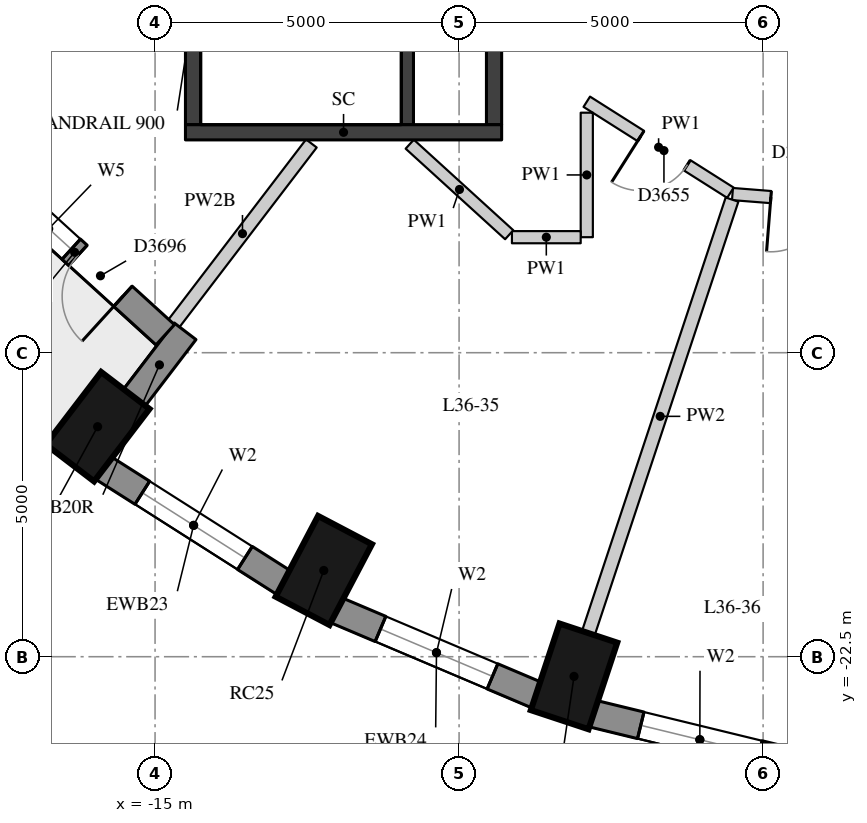
"""IFC4 building model, lengths in metres.
Left out: names, types, materials, properties, quantities, classifications, styles, units other than length and angle.
Written with IfcOpenShell. Run it as: python <this file> out.ifc"""

import sys

from ifc_helpers import new_model, si_unit, direction, frame, frame_2d, origin, origin_2d, place, context, subcontext, project, spatial, rectangle, extrude, element, fill, save


model = new_model("IFC4")
c1 = context("Model", 3, precision=1e-05, world=origin(), true_north=direction((0.0, 1.0)))
c2 = subcontext(c1, "Body", "Model", "MODEL_VIEW")
j1 = project(units=[si_unit("LENGTHUNIT", "METRE"), si_unit("PLANEANGLEUNIT", "RADIAN")], contexts=[c1])
p1 = place(None, origin())
s1 = spatial("IfcSite", under=j1, at=p1, CompositionType="ELEMENT")
p2 = place(p1, origin())
s2 = spatial("IfcBuilding", under=s1, at=p2, CompositionType="ELEMENT")
p3 = place(p2, frame((0.0, 0.0, 128.5)))
s3 = spatial("IfcBuildingStorey", under=s2, at=p3, CompositionType="ELEMENT", Elevation=128.5)
for number, where, z_axis, x_axis in (
    (1, (-15.945, -18.717, 0.0), (0.0, 0.0, 1.0), (-0.607, -0.795, 0.0)),
    (2, (-12.225, -21.082, 0.0), (0.0, 0.0, 1.0), (-0.465, -0.885, 0.0)),
    (3, (-8.11, -22.824, 0.0), (0.0, 0.0, 1.0), (-0.315, -0.949, 0.0)),
):
    element("IfcColumn", number, at=place(p3, frame(where, z_axis=z_axis, x_axis=x_axis)), inside=s3, PredefinedType="COLUMN", context=c2, shape_type="SweptSolid", body=[
        extrude(rectangle(XDim=1.5, YDim=1.0, at=origin_2d()), origin(), (0.0, 0.0, 1.0), 3.3),
    ])
p4 = place(p3, frame((-15.856, -19.392, 0.0), z_axis=(0.0, 0.0, 1.0), x_axis=(0.843891947083, -0.53651317006, 0.0)))
e4 = element("IfcWall", 4, at=p4, inside=s3, PredefinedType="SOLIDWALL", context=c2, shape_type="SweptSolid", body=[
    extrude(rectangle(XDim=3.532, YDim=0.45, at=frame_2d((1.766, 0.0))), origin(), (0.0, 0.0, 1.0), 3.02),
])
p5 = place(p4, frame((0.766, 0.0, 0.4)))
e5 = element("IfcOpeningElement", 5, at=p5, cuts=e4, PredefinedType="OPENING", context=c2, shape_type="SweptSolid", body=[
    extrude(rectangle(XDim=2.0, YDim=1.75, at=frame_2d((1.0, 0.875))), frame((0.0, 0.235, 0.0), z_axis=(0.0, -1.0, 0.0), x_axis=(1.0, 0.0, 0.0)), (0.0, 0.0, 1.0), 0.47),
])
p6 = place(p3, frame((-12.025, -21.733, 0.0), z_axis=(0.0, 0.0, 1.0), x_axis=(0.920879975612, -0.389846213932, 0.0)))
e6 = element("IfcWall", 6, at=p6, inside=s3, PredefinedType="SOLIDWALL", context=c2, shape_type="SweptSolid", body=[
    extrude(rectangle(XDim=3.592, YDim=0.45, at=frame_2d((1.796, 0.0))), origin(), (0.0, 0.0, 1.0), 3.02),
])
p7 = place(p6, frame((0.796, 0.0, 0.4)))
e7 = element("IfcOpeningElement", 7, at=p7, cuts=e6, PredefinedType="OPENING", context=c2, shape_type="SweptSolid", body=[
    extrude(rectangle(XDim=2.0, YDim=1.75, at=frame_2d((1.0, 0.875))), frame((0.0, 0.235, 0.0), z_axis=(0.0, -1.0, 0.0), x_axis=(1.0, 0.0, 0.0)), (0.0, 0.0, 1.0), 0.47),
])
p8 = place(p3, frame((-7.807, -23.435, 0.0), z_axis=(0.0, 0.0, 1.0), x_axis=(0.971667603162, -0.236351579148, 0.0)))
e8 = element("IfcWall", 8, at=p8, inside=s3, PredefinedType="SOLIDWALL", context=c2, shape_type="SweptSolid", body=[
    extrude(rectangle(XDim=3.635, YDim=0.45, at=frame_2d((1.817, 0.0))), origin(), (0.0, 0.0, 1.0), 3.02),
])
p9 = place(p8, frame((0.817, 0.0, 0.4)))
e9 = element("IfcOpeningElement", 9, at=p9, cuts=e8, PredefinedType="OPENING", context=c2, shape_type="SweptSolid", body=[
    extrude(rectangle(XDim=2.0, YDim=1.75, at=frame_2d((1.0, 0.875))), frame((0.0, 0.235, 0.0), z_axis=(0.0, -1.0, 0.0), x_axis=(1.0, 0.0, 0.0)), (0.0, 0.0, 1.0), 0.47),
])
p10 = place(p3, frame((-15.35, -18.253, 0.0), z_axis=(0.0, 0.0, 1.0), x_axis=(0.607026495834, 0.794681592435, 0.0)))
e10 = element("IfcWall", 10, at=p10, inside=s3, PredefinedType="SOLIDWALL", context=c2, shape_type="SweptSolid", body=[
    extrude(rectangle(XDim=1.391, YDim=0.45, at=frame_2d((0.695, 0.0))), origin(), (0.0, 0.0, 1.0), 2.57),
])
p11 = place(p3, frame((-17.814, -14.491, 0.0), z_axis=(0.0, 0.0, 1.0), x_axis=(0.73951517403, -0.673139886933, 0.0)))
e11 = element("IfcWall", 11, at=p11, inside=s3, PredefinedType="SOLIDWALL", context=c2, shape_type="SweptSolid", body=[
    extrude(rectangle(XDim=4.031, YDim=0.45, at=frame_2d((2.016, 0.0))), origin(), (0.0, 0.0, 1.0), 3.02),
])
p12 = place(p11, frame((0.941, 0.0, 0.4)))
e12 = element("IfcOpeningElement", 12, at=p12, cuts=e11, PredefinedType="OPENING", context=c2, shape_type="SweptSolid", body=[
    extrude(rectangle(XDim=1.0, YDim=1.75, at=frame_2d((0.5, 0.875))), frame((0.0, 0.235, 0.0), z_axis=(0.0, -1.0, 0.0), x_axis=(1.0, 0.0, 0.0)), (0.0, 0.0, 1.0), 0.47),
])
p13 = place(p11, frame((2.091, 0.0, 0.0)))
e13 = element("IfcOpeningElement", 13, at=p13, cuts=e11, PredefinedType="OPENING", context=c2, shape_type="SweptSolid", body=[
    extrude(rectangle(XDim=1.0, YDim=2.15, at=frame_2d((0.5, 1.075))), frame((0.0, 0.235, 0.0), z_axis=(0.0, -1.0, 0.0), x_axis=(1.0, 0.0, 0.0)), (0.0, 0.0, 1.0), 0.47),
])
p14 = place(p3, frame((-10.85, -13.75, 0.0), z_axis=(0.0, 0.0, 1.0), x_axis=(0.0, 1.0, 0.0)))
e14 = element("IfcWall", 14, at=p14, inside=s3, PredefinedType="SHEAR", context=c2, shape_type="SweptSolid", body=[
    extrude(rectangle(XDim=6.0, YDim=0.2, at=frame_2d((3.0, 0.0))), origin(), (0.0, 0.0, 1.0), 3.02),
])
p15 = place(p14, frame((4.4, 0.0, 0.0)))
e15 = element("IfcOpeningElement", 15, at=p15, cuts=e14, PredefinedType="OPENING", context=c2, shape_type="SweptSolid", body=[
    extrude(rectangle(XDim=1.5, YDim=2.1, at=frame_2d((0.75, 1.05))), frame((0.0, 0.11, 0.0), z_axis=(0.0, -1.0, 0.0), x_axis=(1.0, 0.0, 0.0)), (0.0, 0.0, 1.0), 0.22),
])
p16 = place(p3, frame((-14.375, -13.75, -0.28), z_axis=(0.0, 0.0, 1.0), x_axis=(0.0, 1.0, 0.0)))
e16 = element("IfcWall", 16, at=p16, inside=s3, PredefinedType="SHEAR", context=c2, shape_type="SweptSolid", body=[
    extrude(rectangle(XDim=6.0, YDim=0.25, at=frame_2d((3.0, 0.0))), origin(), (0.0, 0.0, 1.0), 3.3),
])
p17 = place(p3, frame((-9.425, -13.75, -0.28), z_axis=(0.0, 0.0, 1.0), x_axis=(0.0, 1.0, 0.0)))
e17 = element("IfcWall", 17, at=p17, inside=s3, PredefinedType="SHEAR", context=c2, shape_type="SweptSolid", body=[
    extrude(rectangle(XDim=6.0, YDim=0.25, at=frame_2d((3.0, 0.0))), origin(), (0.0, 0.0, 1.0), 3.3),
])
p18 = place(p17, frame((2.4, 0.0, 0.28)))
e18 = element("IfcOpeningElement", 18, at=p18, cuts=e17, PredefinedType="OPENING", context=c2, shape_type="SweptSolid", body=[
    extrude(rectangle(XDim=1.5, YDim=2.1, at=frame_2d((0.75, 1.05))), frame((0.0, 0.135, 0.0), z_axis=(0.0, -1.0, 0.0), x_axis=(1.0, 0.0, 0.0)), (0.0, 0.0, 1.0), 0.27),
])
p19 = place(p3, frame((-14.5, -13.875, -0.28), z_axis=(0.0, 0.0, 1.0), x_axis=(1.0, 0.0, 0.0)))
e19 = element("IfcWall", 19, at=p19, inside=s3, PredefinedType="SHEAR", context=c2, shape_type="SweptSolid", body=[
    extrude(rectangle(XDim=5.2, YDim=0.25, at=frame_2d((2.6, 0.0))), origin(), (0.0, 0.0, 1.0), 3.3),
])
p20 = place(p3, frame((3.971, -15.641, 0.0), z_axis=(0.0, 0.0, 1.0), x_axis=(-0.996873811728, 0.079010148026, 0.0)))
e20 = element("IfcWall", 20, at=p20, inside=s3, PredefinedType="PARTITIONING", context=c2, shape_type="SweptSolid", body=[
    extrude(rectangle(XDim=9.505, YDim=0.2, at=frame_2d((4.752, 0.0))), origin(), (0.0, 0.0, 1.0), 2.42),
])
p21 = place(p20, frame((7.971, 0.0, 0.0)))
e21 = element("IfcOpeningElement", 21, at=p21, cuts=e20, PredefinedType="OPENING", context=c2, shape_type="SweptSolid", body=[
    extrude(rectangle(XDim=0.9, YDim=2.1, at=frame_2d((0.45, 1.05))), frame((0.0, 0.11, 0.0), z_axis=(0.0, -1.0, 0.0), x_axis=(1.0, 0.0, 0.0)), (0.0, 0.0, 1.0), 0.22),
])
p22 = place(p20, frame((3.391, 0.0, 0.0)))
e22 = element("IfcOpeningElement", 22, at=p22, cuts=e20, PredefinedType="OPENING", context=c2, shape_type="SweptSolid", body=[
    extrude(rectangle(XDim=1.0, YDim=2.1, at=frame_2d((0.5, 1.05))), frame((0.0, 0.11, 0.0), z_axis=(0.0, -1.0, 0.0), x_axis=(1.0, 0.0, 0.0)), (0.0, 0.0, 1.0), 0.22),
])
p23 = place(p20, frame((1.866, 0.0, 0.0)))
e23 = element("IfcOpeningElement", 23, at=p23, cuts=e20, PredefinedType="OPENING", context=c2, shape_type="SweptSolid", body=[
    extrude(rectangle(XDim=0.9, YDim=2.1, at=frame_2d((0.45, 1.05))), frame((0.0, 0.11, 0.0), z_axis=(0.0, -1.0, 0.0), x_axis=(1.0, 0.0, 0.0)), (0.0, 0.0, 1.0), 0.22),
])
p24 = place(p3, frame((-5.537, -14.869, 0.0), z_axis=(0.0, 0.0, 1.0), x_axis=(-0.844770404655, 0.535128922242, 0.0)))
e24 = element("IfcWall", 24, at=p24, inside=s3, PredefinedType="PARTITIONING", context=c2, shape_type="SweptSolid", body=[
    extrude(rectangle(XDim=2.797, YDim=0.2, at=frame_2d((1.398, 0.0))), origin(), (0.0, 0.0, 1.0), 3.02),
])
p25 = place(p24, frame((0.844, 0.0, 0.0)))
e25 = element("IfcOpeningElement", 25, at=p25, cuts=e24, PredefinedType="OPENING", context=c2, shape_type="SweptSolid", body=[
    extrude(rectangle(XDim=0.9, YDim=2.1, at=frame_2d((0.45, 1.05))), frame((0.0, 0.11, 0.0), z_axis=(0.0, -1.0, 0.0), x_axis=(1.0, 0.0, 0.0)), (0.0, 0.0, 1.0), 0.22),
])
p26 = place(p3, frame((-7.9, -13.552, 0.0), z_axis=(0.0, 0.0, 1.0), x_axis=(0.0, -1.0, 0.0)))
e26 = element("IfcWall", 26, at=p26, inside=s3, PredefinedType="PARTITIONING", context=c2, shape_type="SweptSolid", body=[
    extrude(rectangle(XDim=2.048, YDim=0.2, at=frame_2d((1.024, 0.0))), origin(), (0.0, 0.0, 1.0), 3.02),
])
p27 = place(p3, frame((-8.0, -15.6, 0.0), z_axis=(0.0, 0.0, 1.0), x_axis=(-1.0, 0.0, 0.0)))
e27 = element("IfcWall", 27, at=p27, inside=s3, PredefinedType="PARTITIONING", context=c2, shape_type="SweptSolid", body=[
    extrude(rectangle(XDim=1.131, YDim=0.2, at=frame_2d((0.565, 0.0))), origin(), (0.0, 0.0, 1.0), 3.02),
])
p28 = place(p3, frame((-9.176, -15.56, 0.0), z_axis=(0.0, 0.0, 1.0), x_axis=(-0.73943556447, 0.673227336044, 0.0)))
e28 = element("IfcWall", 28, at=p28, inside=s3, PredefinedType="PARTITIONING", context=c2, shape_type="SweptSolid", body=[
    extrude(rectangle(XDim=2.212, YDim=0.2, at=frame_2d((1.106, 0.0))), origin(), (0.0, 0.0, 1.0), 3.02),
])
p29 = place(p3, frame((-14.696, -17.025, 0.0), z_axis=(0.0, 0.0, 1.0), x_axis=(0.607059278405, 0.794656550028, 0.0)))
e29 = element("IfcWall", 29, at=p29, inside=s3, PredefinedType="PARTITIONING", context=c2, shape_type="SweptSolid", body=[
    extrude(rectangle(XDim=3.734, YDim=0.22, at=frame_2d((1.867, 0.0))), origin(), (0.0, 0.0, 1.0), 2.57),
])
p30 = place(p3, frame((-7.874, -22.112, 0.0), z_axis=(0.0, 0.0, 1.0), x_axis=(0.314559895628, 0.949237626763, 0.0)))
e30 = element("IfcWall", 30, at=p30, inside=s3, PredefinedType="PARTITIONING", context=c2, shape_type="SweptSolid", body=[
    extrude(rectangle(XDim=7.511, YDim=0.22, at=frame_2d((3.756, 0.0))), origin(), (0.0, 0.0, 1.0), 3.02),
])
p31 = place(p5, origin())
e31 = element("IfcWindow", 31, at=p31, inside=s3, PartitioningType="SINGLE_PANEL", PredefinedType="WINDOW", context=c2, shape_type="SweptSolid", body=[
    extrude(rectangle(XDim=2.0, YDim=1.75, at=frame_2d((1.0, 0.875))), frame((0.0, 0.035, 0.0), z_axis=(0.0, -1.0, 0.0), x_axis=(1.0, 0.0, 0.0)), (0.0, 0.0, 1.0), 0.06),
])
fill(e5, e31)
p32 = place(p7, origin())
e32 = element("IfcWindow", 32, at=p32, inside=s3, PartitioningType="SINGLE_PANEL", PredefinedType="WINDOW", context=c2, shape_type="SweptSolid", body=[
    extrude(rectangle(XDim=2.0, YDim=1.75, at=frame_2d((1.0, 0.875))), frame((0.0, 0.035, 0.0), z_axis=(0.0, -1.0, 0.0), x_axis=(1.0, 0.0, 0.0)), (0.0, 0.0, 1.0), 0.06),
])
fill(e7, e32)
p33 = place(p9, origin())
e33 = element("IfcWindow", 33, at=p33, inside=s3, PartitioningType="SINGLE_PANEL", PredefinedType="WINDOW", context=c2, shape_type="SweptSolid", body=[
    extrude(rectangle(XDim=2.0, YDim=1.75, at=frame_2d((1.0, 0.875))), frame((0.0, 0.035, 0.0), z_axis=(0.0, -1.0, 0.0), x_axis=(1.0, 0.0, 0.0)), (0.0, 0.0, 1.0), 0.06),
])
fill(e9, e33)
p34 = place(p12, origin())
e34 = element("IfcWindow", 34, at=p34, inside=s3, PartitioningType="SINGLE_PANEL", PredefinedType="WINDOW", context=c2, shape_type="SweptSolid", body=[
    extrude(rectangle(XDim=1.0, YDim=1.75, at=frame_2d((0.5, 0.875))), frame((0.0, 0.035, 0.0), z_axis=(0.0, -1.0, 0.0), x_axis=(1.0, 0.0, 0.0)), (0.0, 0.0, 1.0), 0.06),
])
fill(e12, e34)
p35 = place(p13, frame((1.0, 0.0, 0.0), z_axis=(0.0, 0.0, 1.0), x_axis=(-1.0, 0.0, 0.0)))
e35 = element("IfcDoor", 35, at=p35, inside=s3, OperationType="SINGLE_SWING_LEFT", PredefinedType="DOOR", context=c2, shape_type="SweptSolid", body=[
    extrude(rectangle(XDim=1.0, YDim=2.15, at=frame_2d((0.5, 1.075))), frame((0.0, 0.075, 0.0), z_axis=(0.0, -1.0, 0.0), x_axis=(1.0, 0.0, 0.0)), (0.0, 0.0, 1.0), 0.05),
])
fill(e13, e35)
p36 = place(p25, origin())
e36 = element("IfcDoor", 36, at=p36, inside=s3, OperationType="SINGLE_SWING_RIGHT", PredefinedType="DOOR", context=c2, shape_type="SweptSolid", body=[
    extrude(rectangle(XDim=0.9, YDim=2.1, at=frame_2d((0.45, 1.05))), frame((0.0, 0.025, 0.0), z_axis=(0.0, -1.0, 0.0), x_axis=(1.0, 0.0, 0.0)), (0.0, 0.0, 1.0), 0.05),
])
fill(e25, e36)
p37 = place(p21, origin())
e37 = element("IfcDoor", 37, at=p37, inside=s3, OperationType="SINGLE_SWING_RIGHT", PredefinedType="DOOR", context=c2, shape_type="SweptSolid", body=[
    extrude(rectangle(XDim=0.9, YDim=2.1, at=frame_2d((0.45, 1.05))), frame((0.0, 0.025, 0.0), z_axis=(0.0, -1.0, 0.0), x_axis=(1.0, 0.0, 0.0)), (0.0, 0.0, 1.0), 0.05),
])
fill(e21, e37)
save(model, sys.argv[1])
